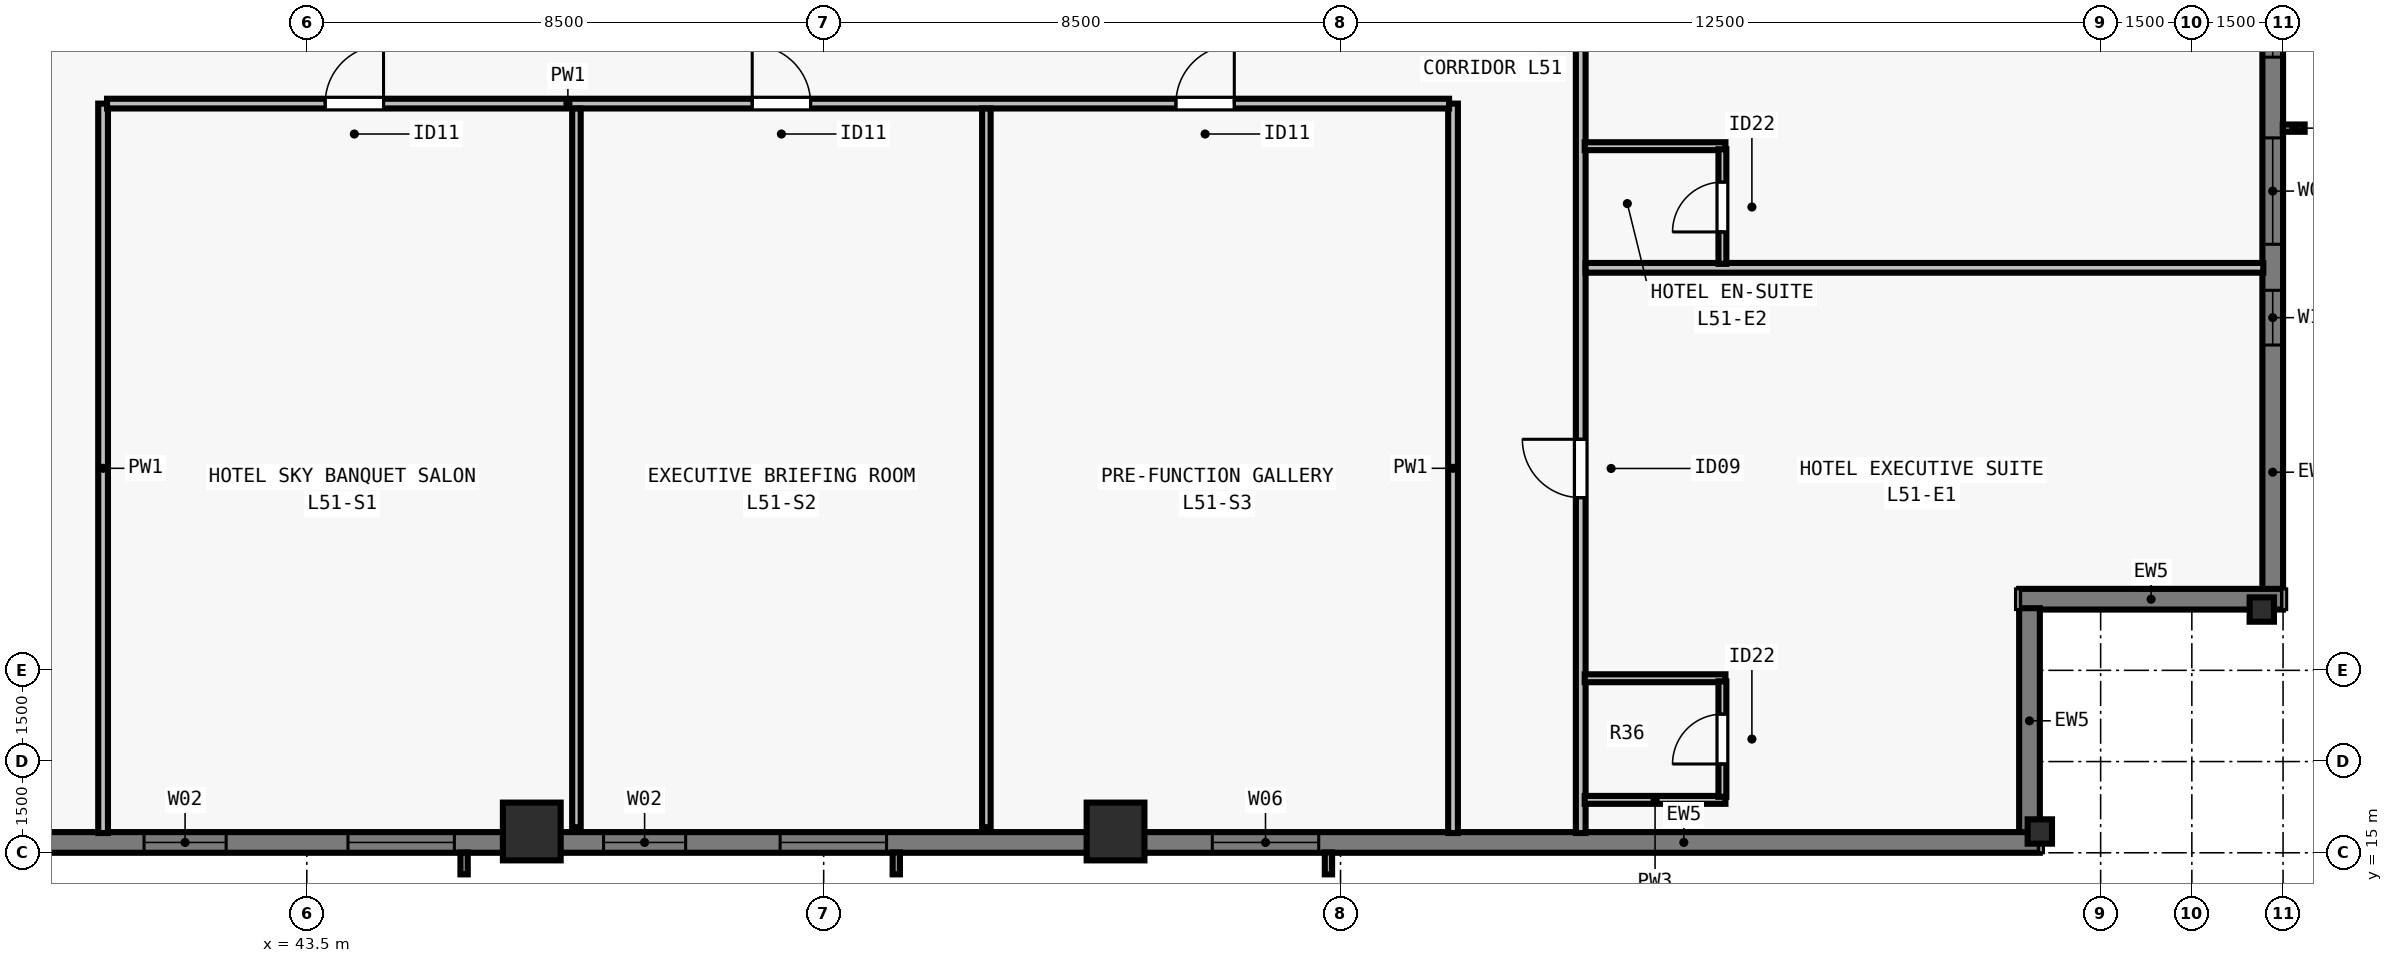
"""IFC4 building model, lengths in metres.
Left out: names, types, materials, properties, quantities, classifications, styles, units other than length and angle.
Written with IfcOpenShell. Run it as: python <this file> out.ifc"""

import sys

from ifc_helpers import new_model, si_unit, direction, frame, frame_2d, origin, origin_2d, place, context, subcontext, project, spatial, rectangle, i_section, extrude, element, fill, save


model = new_model("IFC4")
c1 = context("Model", 3, precision=1e-05, world=origin(), true_north=direction((0.0, 1.0)))
c2 = subcontext(c1, "Body", "Model", "MODEL_VIEW")
j1 = project(units=[si_unit("LENGTHUNIT", "METRE"), si_unit("PLANEANGLEUNIT", "RADIAN")], contexts=[c1])
p1 = place(None, origin())
s1 = spatial("IfcSite", under=j1, at=p1, CompositionType="ELEMENT")
p2 = place(p1, origin())
s2 = spatial("IfcBuilding", under=s1, at=p2, CompositionType="ELEMENT")
p3 = place(p2, frame((0.0, 0.0, 186.5)))
s3 = spatial("IfcBuildingStorey", under=s2, at=p3, CompositionType="ELEMENT", Elevation=186.5)
for number, where, z_axis, x_axis in (
    (1, (47.2, 15.35, 0.0), (0.0, 0.0, 1.0), (1.0, 0.0, 0.0)),
    (2, (56.8, 15.35, 0.0), (0.0, 0.0, 1.0), (1.0, 0.0, 0.0)),
):
    element("IfcColumn", number, at=place(p3, frame(where, z_axis=z_axis, x_axis=x_axis)), inside=s3, PredefinedType="COLUMN", context=c2, shape_type="SweptSolid", body=[
        extrude(rectangle(XDim=0.95, YDim=0.95, at=origin_2d()), origin(), (0.0, 0.0, 1.0), 3.5),
    ])
for number, where, z_axis, x_axis in (
    (3, (72.0, 15.35, 0.0), (0.0, 0.0, 1.0), (1.0, 0.0, 0.0)),
    (4, (75.65, 19.0, 0.0), (0.0, 0.0, 1.0), (0.0, 1.0, 0.0)),
):
    element("IfcColumn", number, at=place(p3, frame(where, z_axis=z_axis, x_axis=x_axis)), inside=s3, PredefinedType="COLUMN", context=c2, shape_type="SweptSolid", body=[
        extrude(i_section(OverallWidth=0.4, OverallDepth=0.4, WebThickness=0.022, FlangeThickness=0.036, at=origin_2d()), origin(), (0.0, 0.0, 1.0), 3.5),
    ])
p4 = place(p3, frame((75.83, 35.6, 0.0), z_axis=(0.0, 0.0, 1.0), x_axis=(0.0, -1.0, 0.0)))
e5 = element("IfcWall", 5, at=p4, inside=s3, PredefinedType="SOLIDWALL", context=c2, shape_type="SweptSolid", body=[
    extrude(rectangle(XDim=16.282, YDim=0.34, at=frame_2d((8.141, 0.0))), origin(), (0.0, 0.0, 1.0), 3.28),
])
p5 = place(p4, frame((2.239, 0.0, 0.8)))
e6 = element("IfcOpeningElement", 6, at=p5, cuts=e5, PredefinedType="OPENING", context=c2, shape_type="SweptSolid", body=[
    extrude(rectangle(XDim=1.75, YDim=1.66, at=frame_2d((0.875, 0.83))), frame((0.0, 0.18, 0.0), z_axis=(0.0, -1.0, 0.0), x_axis=(1.0, 0.0, 0.0)), (0.0, 0.0, 1.0), 0.36),
])
p6 = place(p4, frame((6.166, 0.0, 0.8)))
e7 = element("IfcOpeningElement", 7, at=p6, cuts=e5, PredefinedType="OPENING", context=c2, shape_type="SweptSolid", body=[
    extrude(rectangle(XDim=1.35, YDim=1.66, at=frame_2d((0.675, 0.83))), frame((0.0, 0.18, 0.0), z_axis=(0.0, -1.0, 0.0), x_axis=(1.0, 0.0, 0.0)), (0.0, 0.0, 1.0), 0.36),
])
p7 = place(p4, frame((8.843, 0.0, 0.8)))
e8 = element("IfcOpeningElement", 8, at=p7, cuts=e5, PredefinedType="OPENING", context=c2, shape_type="SweptSolid", body=[
    extrude(rectangle(XDim=1.75, YDim=1.66, at=frame_2d((0.875, 0.83))), frame((0.0, 0.18, 0.0), z_axis=(0.0, -1.0, 0.0), x_axis=(1.0, 0.0, 0.0)), (0.0, 0.0, 1.0), 0.36),
])
p8 = place(p4, frame((11.35, 0.0, 0.8)))
e9 = element("IfcOpeningElement", 9, at=p8, cuts=e5, PredefinedType="OPENING", context=c2, shape_type="SweptSolid", body=[
    extrude(rectangle(XDim=0.9, YDim=1.66, at=frame_2d((0.45, 0.83))), frame((0.0, 0.18, 0.0), z_axis=(0.0, -1.0, 0.0), x_axis=(1.0, 0.0, 0.0)), (0.0, 0.0, 1.0), 0.36),
])
p9 = place(p3, frame((76.0, 19.17, 0.0), z_axis=(0.0, 0.0, 1.0), x_axis=(-1.0, 0.0, 0.0)))
e10 = element("IfcWall", 10, at=p9, inside=s3, PredefinedType="SOLIDWALL", context=c2, shape_type="SweptSolid", body=[
    extrude(rectangle(XDim=4.34, YDim=0.34, at=frame_2d((2.17, 0.0))), origin(), (0.0, 0.0, 1.0), 3.28),
])
p10 = place(p3, frame((71.83, 19.022, 0.0), z_axis=(0.0, 0.0, 1.0), x_axis=(0.0, -1.0, 0.0)))
e11 = element("IfcWall", 11, at=p10, inside=s3, PredefinedType="SOLIDWALL", context=c2, shape_type="SweptSolid", body=[
    extrude(rectangle(XDim=3.704, YDim=0.34, at=frame_2d((1.852, 0.0))), origin(), (0.0, 0.0, 1.0), 3.28),
])
p11 = place(p3, frame((72.0, 15.17, 0.0), z_axis=(0.0, 0.0, 1.0), x_axis=(-1.0, 0.0, 0.0)))
e12 = element("IfcWall", 12, at=p11, inside=s3, PredefinedType="SOLIDWALL", context=c2, shape_type="SweptSolid", body=[
    extrude(rectangle(XDim=39.682, YDim=0.34, at=frame_2d((19.841, 0.0))), origin(), (0.0, 0.0, 1.0), 3.28),
])
p12 = place(p11, frame((11.859, 0.0, 0.8)))
e13 = element("IfcOpeningElement", 13, at=p12, cuts=e12, PredefinedType="OPENING", context=c2, shape_type="SweptSolid", body=[
    extrude(rectangle(XDim=1.75, YDim=1.66, at=frame_2d((0.875, 0.83))), frame((0.0, 0.18, 0.0), z_axis=(0.0, -1.0, 0.0), x_axis=(1.0, 0.0, 0.0)), (0.0, 0.0, 1.0), 0.36),
])
p13 = place(p11, frame((18.966, 0.0, 0.8)))
e14 = element("IfcOpeningElement", 14, at=p13, cuts=e12, PredefinedType="OPENING", context=c2, shape_type="SweptSolid", body=[
    extrude(rectangle(XDim=1.75, YDim=1.66, at=frame_2d((0.875, 0.83))), frame((0.0, 0.18, 0.0), z_axis=(0.0, -1.0, 0.0), x_axis=(1.0, 0.0, 0.0)), (0.0, 0.0, 1.0), 0.36),
])
p14 = place(p11, frame((22.27, 0.0, 0.8)))
e15 = element("IfcOpeningElement", 15, at=p14, cuts=e12, PredefinedType="OPENING", context=c2, shape_type="SweptSolid", body=[
    extrude(rectangle(XDim=1.35, YDim=1.66, at=frame_2d((0.675, 0.83))), frame((0.0, 0.18, 0.0), z_axis=(0.0, -1.0, 0.0), x_axis=(1.0, 0.0, 0.0)), (0.0, 0.0, 1.0), 0.36),
])
p15 = place(p11, frame((26.073, 0.0, 0.8)))
e16 = element("IfcOpeningElement", 16, at=p15, cuts=e12, PredefinedType="OPENING", context=c2, shape_type="SweptSolid", body=[
    extrude(rectangle(XDim=1.75, YDim=1.66, at=frame_2d((0.875, 0.83))), frame((0.0, 0.18, 0.0), z_axis=(0.0, -1.0, 0.0), x_axis=(1.0, 0.0, 0.0)), (0.0, 0.0, 1.0), 0.36),
])
p16 = place(p11, frame((29.827, 0.0, 0.8)))
e17 = element("IfcOpeningElement", 17, at=p16, cuts=e12, PredefinedType="OPENING", context=c2, shape_type="SweptSolid", body=[
    extrude(rectangle(XDim=1.35, YDim=1.66, at=frame_2d((0.675, 0.83))), frame((0.0, 0.18, 0.0), z_axis=(0.0, -1.0, 0.0), x_axis=(1.0, 0.0, 0.0)), (0.0, 0.0, 1.0), 0.36),
])
p17 = place(p3, frame((40.15, 15.325, 0.0), z_axis=(0.0, 0.0, 1.0), x_axis=(0.0, 1.0, 0.0)))
e18 = element("IfcWall", 18, at=p17, inside=s3, PredefinedType="PARTITIONING", context=c2, shape_type="SweptSolid", body=[
    extrude(rectangle(XDim=11.995, YDim=0.16, at=frame_2d((5.998, 0.0))), origin(), (0.0, 0.0, 1.0), 2.555),
])
p18 = place(p3, frame((64.45, 15.325, 0.0), z_axis=(0.0, 0.0, 1.0), x_axis=(0.0, 1.0, 0.0)))
e19 = element("IfcWall", 19, at=p18, inside=s3, PredefinedType="PARTITIONING", context=c2, shape_type="SweptSolid", body=[
    extrude(rectangle(XDim=47.35, YDim=0.16, at=frame_2d((23.675, 0.0))), origin(), (0.0, 0.0, 1.0), 2.555),
])
p19 = place(p18, frame((5.515, 0.0, 0.0)))
e20 = element("IfcOpeningElement", 20, at=p19, cuts=e19, PredefinedType="OPENING", context=c2, shape_type="SweptSolid", body=[
    extrude(rectangle(XDim=0.96, YDim=2.15, at=frame_2d((0.48, 1.075))), frame((0.0, 0.09, 0.0), z_axis=(0.0, -1.0, 0.0), x_axis=(1.0, 0.0, 0.0)), (0.0, 0.0, 1.0), 0.18),
])
p20 = place(p18, frame((14.802, 0.0, 0.0)))
e21 = element("IfcOpeningElement", 21, at=p20, cuts=e19, PredefinedType="OPENING", context=c2, shape_type="SweptSolid", body=[
    extrude(rectangle(XDim=0.96, YDim=2.15, at=frame_2d((0.48, 1.075))), frame((0.0, 0.09, 0.0), z_axis=(0.0, -1.0, 0.0), x_axis=(1.0, 0.0, 0.0)), (0.0, 0.0, 1.0), 0.18),
])
p21 = place(p18, frame((24.234, 0.0, 0.0)))
e22 = element("IfcOpeningElement", 22, at=p21, cuts=e19, PredefinedType="OPENING", context=c2, shape_type="SweptSolid", body=[
    extrude(rectangle(XDim=0.96, YDim=2.15, at=frame_2d((0.48, 1.075))), frame((0.0, 0.09, 0.0), z_axis=(0.0, -1.0, 0.0), x_axis=(1.0, 0.0, 0.0)), (0.0, 0.0, 1.0), 0.18),
])
p22 = place(p18, frame((33.666, 0.0, 0.0)))
e23 = element("IfcOpeningElement", 23, at=p22, cuts=e19, PredefinedType="OPENING", context=c2, shape_type="SweptSolid", body=[
    extrude(rectangle(XDim=0.96, YDim=2.15, at=frame_2d((0.48, 1.075))), frame((0.0, 0.09, 0.0), z_axis=(0.0, -1.0, 0.0), x_axis=(1.0, 0.0, 0.0)), (0.0, 0.0, 1.0), 0.18),
])
p23 = place(p18, frame((43.214, 0.0, 0.0)))
e24 = element("IfcOpeningElement", 24, at=p23, cuts=e19, PredefinedType="OPENING", context=c2, shape_type="SweptSolid", body=[
    extrude(rectangle(XDim=0.96, YDim=2.15, at=frame_2d((0.48, 1.075))), frame((0.0, 0.09, 0.0), z_axis=(0.0, -1.0, 0.0), x_axis=(1.0, 0.0, 0.0)), (0.0, 0.0, 1.0), 0.18),
])
p24 = place(p3, frame((62.35, 15.325, 0.0), z_axis=(0.0, 0.0, 1.0), x_axis=(0.0, 1.0, 0.0)))
e25 = element("IfcWall", 25, at=p24, inside=s3, PredefinedType="PARTITIONING", context=c2, shape_type="SweptSolid", body=[
    extrude(rectangle(XDim=11.995, YDim=0.16, at=frame_2d((5.998, 0.0))), origin(), (0.0, 0.0, 1.0), 3.28),
])
p25 = place(p3, frame((40.215, 27.32, 0.0), z_axis=(0.0, 0.0, 1.0), x_axis=(1.0, 0.0, 0.0)))
e26 = element("IfcWall", 26, at=p25, inside=s3, PredefinedType="PARTITIONING", context=c2, shape_type="SweptSolid", body=[
    extrude(rectangle(XDim=22.07, YDim=0.16, at=frame_2d((11.035, 0.0))), origin(), (0.0, 0.0, 1.0), 3.28),
])
p26 = place(p25, frame((3.587, 0.0, 0.0)))
e27 = element("IfcOpeningElement", 27, at=p26, cuts=e26, PredefinedType="OPENING", context=c2, shape_type="SweptSolid", body=[
    extrude(rectangle(XDim=0.96, YDim=2.12, at=frame_2d((0.48, 1.06))), frame((0.0, 0.09, 0.0), z_axis=(0.0, -1.0, 0.0), x_axis=(1.0, 0.0, 0.0)), (0.0, 0.0, 1.0), 0.18),
])
p27 = place(p25, frame((10.61, 0.0, 0.0)))
e28 = element("IfcOpeningElement", 28, at=p27, cuts=e26, PredefinedType="OPENING", context=c2, shape_type="SweptSolid", body=[
    extrude(rectangle(XDim=0.96, YDim=2.12, at=frame_2d((0.48, 1.06))), frame((0.0, 0.09, 0.0), z_axis=(0.0, -1.0, 0.0), x_axis=(1.0, 0.0, 0.0)), (0.0, 0.0, 1.0), 0.18),
])
p28 = place(p25, frame((17.578, 0.0, 0.0)))
e29 = element("IfcOpeningElement", 29, at=p28, cuts=e26, PredefinedType="OPENING", context=c2, shape_type="SweptSolid", body=[
    extrude(rectangle(XDim=0.96, YDim=2.12, at=frame_2d((0.48, 1.06))), frame((0.0, 0.09, 0.0), z_axis=(0.0, -1.0, 0.0), x_axis=(1.0, 0.0, 0.0)), (0.0, 0.0, 1.0), 0.18),
])
p29 = place(p3, frame((47.934, 15.42, 0.0), z_axis=(0.0, 0.0, 1.0), x_axis=(0.0, 1.0, 0.0)))
e30 = element("IfcWall", 30, at=p29, inside=s3, PredefinedType="PARTITIONING", context=c2, shape_type="SweptSolid", body=[
    extrude(rectangle(XDim=11.82, YDim=0.14, at=frame_2d((5.91, 0.0))), origin(), (0.0, 0.0, 1.0), 2.896),
])
p30 = place(p3, frame((54.676, 15.42, 0.0), z_axis=(0.0, 0.0, 1.0), x_axis=(0.0, 1.0, 0.0)))
e31 = element("IfcWall", 31, at=p30, inside=s3, PredefinedType="PARTITIONING", context=c2, shape_type="SweptSolid", body=[
    extrude(rectangle(XDim=11.82, YDim=0.14, at=frame_2d((5.91, 0.0))), origin(), (0.0, 0.0, 1.0), 3.28),
])
for number, where, z_axis, x_axis in (
    (32, (64.515, 15.87, 0.0), (0.0, 0.0, 1.0), (1.0, 0.0, 0.0)),
    (33, (64.515, 17.87, 0.0), (0.0, 0.0, 1.0), (1.0, 0.0, 0.0)),
):
    element("IfcWall", number, at=place(p3, frame(where, z_axis=z_axis, x_axis=x_axis)), inside=s3, PredefinedType="PLUMBINGWALL", context=c2, shape_type="SweptSolid", body=[
        extrude(rectangle(XDim=2.315, YDim=0.13, at=frame_2d((1.158, 0.0))), origin(), (0.0, 0.0, 1.0), 3.28),
    ])
p31 = place(p3, frame((66.78, 15.92, 0.0), z_axis=(0.0, 0.0, 1.0), x_axis=(0.0, 1.0, 0.0)))
e34 = element("IfcWall", 34, at=p31, inside=s3, PredefinedType="PLUMBINGWALL", context=c2, shape_type="SweptSolid", body=[
    extrude(rectangle(XDim=1.9, YDim=0.13, at=frame_2d((0.95, 0.0))), origin(), (0.0, 0.0, 1.0), 3.28),
])
p32 = place(p31, frame((0.54, 0.0, 0.0)))
e35 = element("IfcOpeningElement", 35, at=p32, cuts=e34, PredefinedType="OPENING", context=c2, shape_type="SweptSolid", body=[
    extrude(rectangle(XDim=0.82, YDim=2.1, at=frame_2d((0.41, 1.05))), frame((0.0, 0.075, 0.0), z_axis=(0.0, -1.0, 0.0), x_axis=(1.0, 0.0, 0.0)), (0.0, 0.0, 1.0), 0.15),
])
p33 = place(p3, frame((64.53, 24.62, 0.0), z_axis=(0.0, 0.0, 1.0), x_axis=(1.0, 0.0, 0.0)))
e36 = element("IfcWall", 36, at=p33, inside=s3, PredefinedType="PARTITIONING", context=c2, shape_type="SweptSolid", body=[
    extrude(rectangle(XDim=11.145, YDim=0.16, at=frame_2d((5.573, 0.0))), origin(), (0.0, 0.0, 1.0), 2.896),
])
p34 = place(p3, frame((64.515, 26.62, 0.0), z_axis=(0.0, 0.0, 1.0), x_axis=(1.0, 0.0, 0.0)))
e37 = element("IfcWall", 37, at=p34, inside=s3, PredefinedType="PLUMBINGWALL", context=c2, shape_type="SweptSolid", body=[
    extrude(rectangle(XDim=2.315, YDim=0.13, at=frame_2d((1.158, 0.0))), origin(), (0.0, 0.0, 1.0), 2.896),
])
p35 = place(p3, frame((66.78, 24.685, 0.0), z_axis=(0.0, 0.0, 1.0), x_axis=(0.0, 1.0, 0.0)))
e38 = element("IfcWall", 38, at=p35, inside=s3, PredefinedType="PLUMBINGWALL", context=c2, shape_type="SweptSolid", body=[
    extrude(rectangle(XDim=1.885, YDim=0.13, at=frame_2d((0.942, 0.0))), origin(), (0.0, 0.0, 1.0), 3.28),
])
p36 = place(p35, frame((0.525, 0.0, 0.0)))
e39 = element("IfcOpeningElement", 39, at=p36, cuts=e38, PredefinedType="OPENING", context=c2, shape_type="SweptSolid", body=[
    extrude(rectangle(XDim=0.82, YDim=2.1, at=frame_2d((0.41, 1.05))), frame((0.0, 0.075, 0.0), z_axis=(0.0, -1.0, 0.0), x_axis=(1.0, 0.0, 0.0)), (0.0, 0.0, 1.0), 0.15),
])
p37 = place(p6, origin())
e40 = element("IfcWindow", 40, at=p37, inside=s3, PartitioningType="SINGLE_PANEL", PredefinedType="WINDOW", context=c2, shape_type="SweptSolid", body=[
    extrude(rectangle(XDim=1.35, YDim=1.66, at=frame_2d((0.675, 0.83))), frame((0.0, -0.05, 0.0), z_axis=(0.0, -1.0, 0.0), x_axis=(1.0, 0.0, 0.0)), (0.0, 0.0, 1.0), 0.06),
])
fill(e7, e40)
p38 = place(p7, origin())
e41 = element("IfcWindow", 41, at=p38, inside=s3, PartitioningType="SINGLE_PANEL", PredefinedType="WINDOW", context=c2, shape_type="SweptSolid", body=[
    extrude(rectangle(XDim=1.75, YDim=1.66, at=frame_2d((0.875, 0.83))), frame((0.0, -0.05, 0.0), z_axis=(0.0, -1.0, 0.0), x_axis=(1.0, 0.0, 0.0)), (0.0, 0.0, 1.0), 0.06),
])
fill(e8, e41)
p39 = place(p12, origin())
e42 = element("IfcWindow", 42, at=p39, inside=s3, PartitioningType="SINGLE_PANEL", PredefinedType="WINDOW", context=c2, shape_type="SweptSolid", body=[
    extrude(rectangle(XDim=1.75, YDim=1.66, at=frame_2d((0.875, 0.83))), frame((0.0, -0.05, 0.0), z_axis=(0.0, -1.0, 0.0), x_axis=(1.0, 0.0, 0.0)), (0.0, 0.0, 1.0), 0.06),
])
fill(e13, e42)
p40 = place(p13, origin())
e43 = element("IfcWindow", 43, at=p40, inside=s3, PartitioningType="SINGLE_PANEL", PredefinedType="WINDOW", context=c2, shape_type="SweptSolid", body=[
    extrude(rectangle(XDim=1.75, YDim=1.66, at=frame_2d((0.875, 0.83))), frame((0.0, -0.05, 0.0), z_axis=(0.0, -1.0, 0.0), x_axis=(1.0, 0.0, 0.0)), (0.0, 0.0, 1.0), 0.06),
])
fill(e14, e43)
p41 = place(p14, origin())
e44 = element("IfcWindow", 44, at=p41, inside=s3, PartitioningType="SINGLE_PANEL", PredefinedType="WINDOW", context=c2, shape_type="SweptSolid", body=[
    extrude(rectangle(XDim=1.35, YDim=1.66, at=frame_2d((0.675, 0.83))), frame((0.0, -0.05, 0.0), z_axis=(0.0, -1.0, 0.0), x_axis=(1.0, 0.0, 0.0)), (0.0, 0.0, 1.0), 0.06),
])
fill(e15, e44)
p42 = place(p15, origin())
e45 = element("IfcWindow", 45, at=p42, inside=s3, PartitioningType="SINGLE_PANEL", PredefinedType="WINDOW", context=c2, shape_type="SweptSolid", body=[
    extrude(rectangle(XDim=1.75, YDim=1.66, at=frame_2d((0.875, 0.83))), frame((0.0, -0.05, 0.0), z_axis=(0.0, -1.0, 0.0), x_axis=(1.0, 0.0, 0.0)), (0.0, 0.0, 1.0), 0.06),
])
fill(e16, e45)
p43 = place(p16, origin())
e46 = element("IfcWindow", 46, at=p43, inside=s3, PartitioningType="SINGLE_PANEL", PredefinedType="WINDOW", context=c2, shape_type="SweptSolid", body=[
    extrude(rectangle(XDim=1.35, YDim=1.66, at=frame_2d((0.675, 0.83))), frame((0.0, -0.05, 0.0), z_axis=(0.0, -1.0, 0.0), x_axis=(1.0, 0.0, 0.0)), (0.0, 0.0, 1.0), 0.06),
])
fill(e17, e46)
p44 = place(p8, origin())
e47 = element("IfcWindow", 47, at=p44, inside=s3, PartitioningType="SINGLE_PANEL", PredefinedType="WINDOW", context=c2, shape_type="SweptSolid", body=[
    extrude(rectangle(XDim=0.9, YDim=1.66, at=frame_2d((0.45, 0.83))), frame((0.0, -0.04, 0.0), z_axis=(0.0, -1.0, 0.0), x_axis=(1.0, 0.0, 0.0)), (0.0, 0.0, 1.0), 0.06),
])
fill(e9, e47)
p45 = place(p26, origin())
e48 = element("IfcDoor", 48, at=p45, inside=s3, OperationType="SINGLE_SWING_RIGHT", PredefinedType="DOOR", context=c2, shape_type="SweptSolid", body=[
    extrude(rectangle(XDim=0.96, YDim=2.12, at=frame_2d((0.48, 1.06))), frame((0.0, 0.025, 0.0), z_axis=(0.0, -1.0, 0.0), x_axis=(1.0, 0.0, 0.0)), (0.0, 0.0, 1.0), 0.05),
])
fill(e27, e48)
p46 = place(p27, origin())
e49 = element("IfcDoor", 49, at=p46, inside=s3, OperationType="SINGLE_SWING_LEFT", PredefinedType="DOOR", context=c2, shape_type="SweptSolid", body=[
    extrude(rectangle(XDim=0.96, YDim=2.12, at=frame_2d((0.48, 1.06))), frame((0.0, 0.025, 0.0), z_axis=(0.0, -1.0, 0.0), x_axis=(1.0, 0.0, 0.0)), (0.0, 0.0, 1.0), 0.05),
])
fill(e28, e49)
p47 = place(p28, origin())
e50 = element("IfcDoor", 50, at=p47, inside=s3, OperationType="SINGLE_SWING_RIGHT", PredefinedType="DOOR", context=c2, shape_type="SweptSolid", body=[
    extrude(rectangle(XDim=0.96, YDim=2.12, at=frame_2d((0.48, 1.06))), frame((0.0, 0.025, 0.0), z_axis=(0.0, -1.0, 0.0), x_axis=(1.0, 0.0, 0.0)), (0.0, 0.0, 1.0), 0.05),
])
fill(e29, e50)
p48 = place(p32, origin())
e51 = element("IfcDoor", 51, at=p48, inside=s3, OperationType="SINGLE_SWING_LEFT", PredefinedType="DOOR", context=c2, shape_type="SweptSolid", body=[
    extrude(rectangle(XDim=0.82, YDim=2.1, at=frame_2d((0.41, 1.05))), frame((0.0, 0.025, 0.0), z_axis=(0.0, -1.0, 0.0), x_axis=(1.0, 0.0, 0.0)), (0.0, 0.0, 1.0), 0.05),
])
fill(e35, e51)
p49 = place(p19, origin())
e52 = element("IfcDoor", 52, at=p49, inside=s3, OperationType="SINGLE_SWING_RIGHT", PredefinedType="DOOR", context=c2, shape_type="SweptSolid", body=[
    extrude(rectangle(XDim=0.96, YDim=2.15, at=frame_2d((0.48, 1.075))), frame((0.0, 0.025, 0.0), z_axis=(0.0, -1.0, 0.0), x_axis=(1.0, 0.0, 0.0)), (0.0, 0.0, 1.0), 0.05),
])
fill(e20, e52)
p50 = place(p36, origin())
e53 = element("IfcDoor", 53, at=p50, inside=s3, OperationType="SINGLE_SWING_LEFT", PredefinedType="DOOR", context=c2, shape_type="SweptSolid", body=[
    extrude(rectangle(XDim=0.82, YDim=2.1, at=frame_2d((0.41, 1.05))), frame((0.0, 0.025, 0.0), z_axis=(0.0, -1.0, 0.0), x_axis=(1.0, 0.0, 0.0)), (0.0, 0.0, 1.0), 0.05),
])
fill(e39, e53)
save(model, sys.argv[1])
